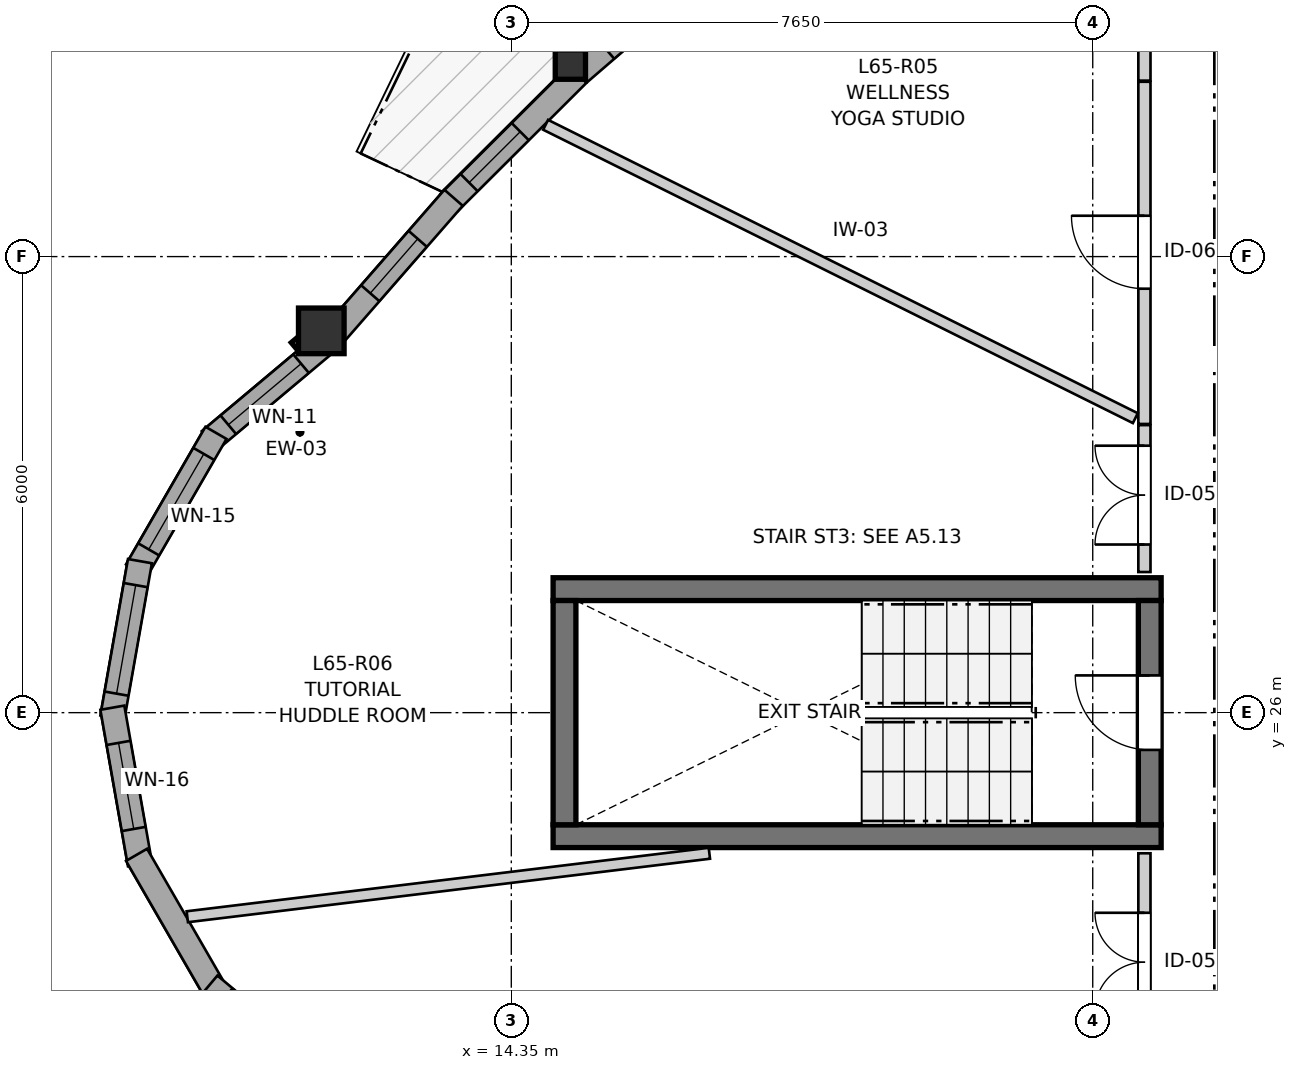
"""IFC4 building model, lengths in metres.
Left out: names, types, materials, properties, quantities, classifications, styles, units other than length and angle.
Written with IfcOpenShell. Run it as: python <this file> out.ifc"""

import sys

from ifc_helpers import new_model, si_unit, direction, frame, frame_2d, origin, origin_2d, place, context, subcontext, project, spatial, rectangle, i_section, extrude, source, transform, mapped, element, fill, save


model = new_model("IFC4")
c1 = context("Model", 3, precision=1e-05, world=origin(), true_north=direction((0.0, 1.0)))
c2 = subcontext(c1, "Body", "Model", "MODEL_VIEW")
j1 = project(units=[si_unit("LENGTHUNIT", "METRE"), si_unit("PLANEANGLEUNIT", "RADIAN")], contexts=[c1])
p1 = place(None, origin())
s1 = spatial("IfcSite", under=j1, at=p1, CompositionType="ELEMENT")
p2 = place(p1, origin())
s2 = spatial("IfcBuilding", under=s1, at=p2, CompositionType="ELEMENT")
p3 = place(p2, frame((0.0, 0.0, 218.0)))
s3 = spatial("IfcBuildingStorey", under=s2, at=p3, CompositionType="ELEMENT", Elevation=218.0)
for number, where, z_axis, x_axis in (
    (1, (14.9, 24.375, 0.0), (0.0, 0.0, 1.0), (1.0, 0.0, 0.0)),
    (2, (22.9, 27.625, 0.0), (0.0, 0.0, 1.0), (-1.0, 0.0, 0.0)),
):
    element("IfcWall", number, at=place(p3, frame(where, z_axis=z_axis, x_axis=x_axis)), inside=s3, PredefinedType="SHEAR", context=c2, shape_type="SweptSolid", body=[
        extrude(rectangle(XDim=8.0, YDim=0.3, at=frame_2d((4.0, 0.0))), origin(), (0.0, 0.0, 1.0), 2.96),
    ])
p4 = place(p3, frame((15.05, 27.475, 0.0), z_axis=(0.0, 0.0, 1.0), x_axis=(0.0, -1.0, 0.0)))
e3 = element("IfcWall", 3, at=p4, inside=s3, PredefinedType="SHEAR", context=c2, shape_type="SweptSolid", body=[
    extrude(rectangle(XDim=2.95, YDim=0.3, at=frame_2d((1.475, 0.0))), origin(), (0.0, 0.0, 1.0), 2.96),
])
p5 = place(p3, frame((22.75, 24.525, 0.0), z_axis=(0.0, 0.0, 1.0), x_axis=(0.0, 1.0, 0.0)))
e4 = element("IfcWall", 4, at=p5, inside=s3, PredefinedType="SHEAR", context=c2, shape_type="SweptSolid", body=[
    extrude(rectangle(XDim=2.95, YDim=0.3, at=frame_2d((1.475, 0.0))), origin(), (0.0, 0.0, 1.0), 2.96),
])
p6 = place(p5, frame((0.985, 0.0, 0.0)))
e5 = element("IfcOpeningElement", 5, at=p6, cuts=e4, PredefinedType="OPENING", context=c2, shape_type="SweptSolid", body=[
    extrude(rectangle(XDim=0.98, YDim=2.15, at=frame_2d((0.49, 1.075))), frame((0.0, 0.16, 0.0), z_axis=(0.0, -1.0, 0.0), x_axis=(1.0, 0.0, 0.0)), (0.0, 0.0, 1.0), 0.32),
])
m1 = source(origin(), c2, "Body", "SweptSolid", [
    extrude(rectangle(XDim=0.6, YDim=0.6, at=origin_2d()), origin(), (0.0, 0.0, 1.0), 2.96),
])
p7 = place(p3, frame((11.85, 31.023, 0.0), z_axis=(0.0, 0.0, 1.0), x_axis=(1.0, 0.0, 0.0)))
e6 = element("IfcColumn", 6, at=p7, inside=s3, PredefinedType="COLUMN", context=c2, shape_type="MappedRepresentation", body=[
    mapped(m1, transform((0.0, 0.0, 0.0), x_axis=(1.0, 0.0, 0.0), y_axis=(0.0, 1.0, 0.0), z_axis=(0.0, 0.0, 1.0), scale=1.0)),
])
m2 = source(origin(), c2, "Body", "SweptSolid", [
    extrude(i_section(OverallWidth=0.398, OverallDepth=0.387, WebThickness=0.019, FlangeThickness=0.03, FilletRadius=0.015, at=origin_2d()), origin(), (0.0, 0.0, 1.0), 2.96),
])
p8 = place(p3, frame((15.127, 34.526, 0.0), z_axis=(0.0, 0.0, 1.0), x_axis=(1.0, 0.0, 0.0)))
e7 = element("IfcColumn", 7, at=p8, inside=s3, PredefinedType="PILASTER", context=c2, shape_type="MappedRepresentation", body=[
    mapped(m2, transform((0.0, 0.0, 0.0), x_axis=(1.0, 0.0, 0.0), y_axis=(0.0, 1.0, 0.0), z_axis=(0.0, 0.0, 1.0), scale=1.0)),
])
p9 = place(p3, frame((11.884, 30.843, 0.0), z_axis=(0.0, 0.0, 1.0), x_axis=(-0.76606505432, -0.642763045414, 0.0)))
e8 = element("IfcWall", 8, at=p9, inside=s3, PredefinedType="SOLIDWALL", context=c2, shape_type="SweptSolid", body=[
    extrude(rectangle(XDim=1.962, YDim=0.32, at=frame_2d((0.981, 0.0))), origin(), (0.0, 0.0, 1.0), 2.58),
])
p10 = place(p9, frame((0.391, 0.0, 0.82)))
e9 = element("IfcOpeningElement", 9, at=p10, cuts=e8, PredefinedType="OPENING", context=c2, shape_type="SweptSolid", body=[
    extrude(rectangle(XDim=1.25, YDim=1.35, at=frame_2d((0.625, 0.675))), frame((0.0, 0.17, 0.0), z_axis=(0.0, -1.0, 0.0), x_axis=(1.0, 0.0, 0.0)), (0.0, 0.0, 1.0), 0.34),
])
p11 = place(p3, frame((10.465, 29.681, 0.0), z_axis=(0.0, 0.0, 1.0), x_axis=(-0.499995423472, -0.866028046028, 0.0)))
e10 = element("IfcWall", 10, at=p11, inside=s3, PredefinedType="SOLIDWALL", context=c2, shape_type="SweptSolid", body=[
    extrude(rectangle(XDim=2.09, YDim=0.32, at=frame_2d((1.045, 0.0))), origin(), (0.0, 0.0, 1.0), 2.58),
])
p12 = place(p11, frame((0.32, 0.0, 0.82)))
e11 = element("IfcOpeningElement", 11, at=p12, cuts=e10, PredefinedType="OPENING", context=c2, shape_type="SweptSolid", body=[
    extrude(rectangle(XDim=1.45, YDim=1.25, at=frame_2d((0.725, 0.625))), frame((0.0, 0.17, 0.0), z_axis=(0.0, -1.0, 0.0), x_axis=(1.0, 0.0, 0.0)), (0.0, 0.0, 1.0), 0.34),
])
p13 = place(p3, frame((9.464, 27.993, 0.0), z_axis=(0.0, 0.0, 1.0), x_axis=(-0.173672066494, -0.984803540469, 0.0)))
e12 = element("IfcWall", 12, at=p13, inside=s3, PredefinedType="SOLIDWALL", context=c2, shape_type="SweptSolid", body=[
    extrude(rectangle(XDim=2.09, YDim=0.32, at=frame_2d((1.045, 0.0))), origin(), (0.0, 0.0, 1.0), 2.58),
])
p14 = place(p13, frame((0.32, 0.0, 0.82)))
e13 = element("IfcOpeningElement", 13, at=p14, cuts=e12, PredefinedType="OPENING", context=c2, shape_type="SweptSolid", body=[
    extrude(rectangle(XDim=1.45, YDim=1.25, at=frame_2d((0.725, 0.625))), frame((0.0, 0.17, 0.0), z_axis=(0.0, -1.0, 0.0), x_axis=(1.0, 0.0, 0.0)), (0.0, 0.0, 1.0), 0.34),
])
p15 = place(p3, frame((9.101, 26.065, 0.0), z_axis=(0.0, 0.0, 1.0), x_axis=(0.173672066494, -0.984803540469, 0.0)))
e14 = element("IfcWall", 14, at=p15, inside=s3, PredefinedType="SOLIDWALL", context=c2, shape_type="SweptSolid", body=[
    extrude(rectangle(XDim=2.09, YDim=0.32, at=frame_2d((1.045, 0.0))), origin(), (0.0, 0.0, 1.0), 2.58),
])
p16 = place(p15, frame((0.47, 0.0, 0.82)))
e15 = element("IfcOpeningElement", 15, at=p16, cuts=e14, PredefinedType="OPENING", context=c2, shape_type="SweptSolid", body=[
    extrude(rectangle(XDim=1.15, YDim=1.2, at=frame_2d((0.575, 0.6))), frame((0.0, 0.17, 0.0), z_axis=(0.0, -1.0, 0.0), x_axis=(1.0, 0.0, 0.0)), (0.0, 0.0, 1.0), 0.34),
])
p17 = place(p3, frame((9.419, 24.129, 0.0), z_axis=(0.0, 0.0, 1.0), x_axis=(0.499995423472, -0.866028046028, 0.0)))
e16 = element("IfcWall", 16, at=p17, inside=s3, PredefinedType="SOLIDWALL", context=c2, shape_type="SweptSolid", body=[
    extrude(rectangle(XDim=2.09, YDim=0.32, at=frame_2d((1.045, 0.0))), origin(), (0.0, 0.0, 1.0), 2.58),
])
p18 = place(p3, frame((10.381, 22.419, 0.0), z_axis=(0.0, 0.0, 1.0), x_axis=(0.766099948115, -0.642721455608, 0.0)))
e17 = element("IfcWall", 17, at=p18, inside=s3, PredefinedType="SOLIDWALL", context=c2, shape_type="SweptSolid", body=[
    extrude(rectangle(XDim=2.032, YDim=0.32, at=frame_2d((1.016, 0.0))), origin(), (0.0, 0.0, 1.0), 2.58),
])
p19 = place(p18, frame((0.261, 0.0, 0.82)))
e18 = element("IfcOpeningElement", 18, at=p19, cuts=e17, PredefinedType="OPENING", context=c2, shape_type="SweptSolid", body=[
    extrude(rectangle(XDim=1.45, YDim=1.25, at=frame_2d((0.725, 0.625))), frame((0.0, 0.17, 0.0), z_axis=(0.0, -1.0, 0.0), x_axis=(1.0, 0.0, 0.0)), (0.0, 0.0, 1.0), 0.34),
])
p20 = place(p3, frame((17.03, 35.955, 0.0), z_axis=(0.0, 0.0, 1.0), x_axis=(-0.757489541562, -0.652847297937, 0.0)))
e19 = element("IfcWall", 19, at=p20, inside=s3, PredefinedType="SOLIDWALL", context=c2, shape_type="SweptSolid", body=[
    extrude(rectangle(XDim=2.354, YDim=0.32, at=frame_2d((1.177, 0.0))), origin(), (0.0, 0.0, 1.0), 2.58),
])
p21 = place(p20, frame((0.487, 0.0, 0.82)))
e20 = element("IfcOpeningElement", 20, at=p21, cuts=e19, PredefinedType="OPENING", context=c2, shape_type="SweptSolid", body=[
    extrude(rectangle(XDim=1.4, YDim=1.35, at=frame_2d((0.7, 0.675))), frame((0.0, 0.17, 0.0), z_axis=(0.0, -1.0, 0.0), x_axis=(1.0, 0.0, 0.0)), (0.0, 0.0, 1.0), 0.34),
])
p22 = place(p3, frame((15.226, 34.399, 0.0), z_axis=(0.0, 0.0, 1.0), x_axis=(-0.708431997636, -0.705779076429, 0.0)))
e21 = element("IfcWall", 21, at=p22, inside=s3, PredefinedType="SOLIDWALL", context=c2, shape_type="SweptSolid", body=[
    extrude(rectangle(XDim=2.393, YDim=0.32, at=frame_2d((1.196, 0.0))), origin(), (0.0, 0.0, 1.0), 2.58),
])
p23 = place(p22, frame((1.07, 0.0, 0.82)))
e22 = element("IfcOpeningElement", 22, at=p23, cuts=e21, PredefinedType="OPENING", context=c2, shape_type="SweptSolid", body=[
    extrude(rectangle(XDim=0.95, YDim=1.35, at=frame_2d((0.475, 0.675))), frame((0.0, 0.17, 0.0), z_axis=(0.0, -1.0, 0.0), x_axis=(1.0, 0.0, 0.0)), (0.0, 0.0, 1.0), 0.34),
])
p24 = place(p3, frame((13.591, 32.774, 0.0), z_axis=(0.0, 0.0, 1.0), x_axis=(-0.657601126926, -0.753366283999, 0.0)))
e23 = element("IfcWall", 23, at=p24, inside=s3, PredefinedType="SOLIDWALL", context=c2, shape_type="SweptSolid", body=[
    extrude(rectangle(XDim=2.374, YDim=0.32, at=frame_2d((1.187, 0.0))), origin(), (0.0, 0.0, 1.0), 2.58),
])
p25 = place(p24, frame((0.717, 0.0, 0.82)))
e24 = element("IfcOpeningElement", 24, at=p25, cuts=e23, PredefinedType="OPENING", context=c2, shape_type="SweptSolid", body=[
    extrude(rectangle(XDim=0.95, YDim=1.35, at=frame_2d((0.475, 0.675))), frame((0.0, 0.17, 0.0), z_axis=(0.0, -1.0, 0.0), x_axis=(1.0, 0.0, 0.0)), (0.0, 0.0, 1.0), 0.34),
])
p26 = place(p3, frame((22.68, 29.798, 0.0), z_axis=(0.0, 0.0, 1.0), x_axis=(0.0, 1.0, 0.0)))
e25 = element("IfcWall", 25, at=p26, inside=s3, PredefinedType="PARTITIONING", context=c2, shape_type="SweptSolid", body=[
    extrude(rectangle(XDim=4.502, YDim=0.16, at=frame_2d((2.251, 0.0))), origin(), (0.0, 0.0, 1.0), 2.96),
])
p27 = place(p26, frame((1.78, 0.0, 0.0)))
e26 = element("IfcOpeningElement", 26, at=p27, cuts=e25, PredefinedType="OPENING", context=c2, shape_type="SweptSolid", body=[
    extrude(rectangle(XDim=0.96, YDim=2.1, at=frame_2d((0.48, 1.05))), frame((0.0, 0.09, 0.0), z_axis=(0.0, -1.0, 0.0), x_axis=(1.0, 0.0, 0.0)), (0.0, 0.0, 1.0), 0.18),
])
p28 = place(p3, frame((22.68, 21.241, 0.0), z_axis=(0.0, 0.0, 1.0), x_axis=(0.0, 1.0, 0.0)))
e27 = element("IfcWall", 27, at=p28, inside=s3, PredefinedType="PARTITIONING", context=c2, shape_type="SweptSolid", body=[
    extrude(rectangle(XDim=2.909, YDim=0.16, at=frame_2d((1.455, 0.0))), origin(), (0.0, 0.0, 1.0), 2.96),
])
p29 = place(p28, frame((0.826, 0.0, 0.0)))
e28 = element("IfcOpeningElement", 28, at=p29, cuts=e27, PredefinedType="OPENING", context=c2, shape_type="SweptSolid", body=[
    extrude(rectangle(XDim=1.3, YDim=2.1, at=frame_2d((0.65, 1.05))), frame((0.0, 0.09, 0.0), z_axis=(0.0, -1.0, 0.0), x_axis=(1.0, 0.0, 0.0)), (0.0, 0.0, 1.0), 0.18),
])
p30 = place(p3, frame((22.68, 27.85, 0.0), z_axis=(0.0, 0.0, 1.0), x_axis=(0.0, 1.0, 0.0)))
e29 = element("IfcWall", 29, at=p30, inside=s3, PredefinedType="PARTITIONING", context=c2, shape_type="SweptSolid", body=[
    extrude(rectangle(XDim=1.933, YDim=0.16, at=frame_2d((0.966, 0.0))), origin(), (0.0, 0.0, 1.0), 2.96),
])
p31 = place(p30, frame((0.362, 0.0, 0.0)))
e30 = element("IfcOpeningElement", 30, at=p31, cuts=e29, PredefinedType="OPENING", context=c2, shape_type="SweptSolid", body=[
    extrude(rectangle(XDim=1.3, YDim=2.1, at=frame_2d((0.65, 1.05))), frame((0.0, 0.09, 0.0), z_axis=(0.0, -1.0, 0.0), x_axis=(1.0, 0.0, 0.0)), (0.0, 0.0, 1.0), 0.18),
])
p32 = place(p3, frame((14.802, 33.734, 0.0), z_axis=(0.0, 0.0, 1.0), x_axis=(0.895354955696, -0.445353234311, 0.0)))
e31 = element("IfcWall", 31, at=p32, inside=s3, PredefinedType="PARTITIONING", context=c2, shape_type="SweptSolid", body=[
    extrude(rectangle(XDim=8.666, YDim=0.145, at=frame_2d((4.333, 0.0))), origin(), (0.0, 0.0, 1.0), 2.96),
])
p33 = place(p3, frame((10.087, 23.315, 0.0), z_axis=(0.0, 0.0, 1.0), x_axis=(0.992692853732, 0.120668546642, 0.0)))
e32 = element("IfcWall", 32, at=p33, inside=s3, PredefinedType="PARTITIONING", context=c2, shape_type="SweptSolid", body=[
    extrude(rectangle(XDim=6.919, YDim=0.145, at=frame_2d((3.46, 0.0))), origin(), (0.0, 0.0, 1.0), 2.96),
])
p34 = place(p3, frame((22.68, 34.315, 0.0), z_axis=(0.0, 0.0, 1.0), x_axis=(0.0, 1.0, 0.0)))
e33 = element("IfcWall", 33, at=p34, inside=s3, PredefinedType="PARTITIONING", context=c2, shape_type="SweptSolid", body=[
    extrude(rectangle(XDim=0.707, YDim=0.16, at=frame_2d((0.353, 0.0))), origin(), (0.0, 0.0, 1.0), 2.96),
])
m3 = source(origin(), c2, "Body", "SweptSolid", [
    extrude(rectangle(XDim=1.25, YDim=1.35, at=frame_2d((0.625, 0.675))), frame((0.0, 0.03, 0.0), z_axis=(0.0, -1.0, 0.0), x_axis=(1.0, 0.0, 0.0)), (0.0, 0.0, 1.0), 0.06),
])
p35 = place(p10, origin())
e34 = element("IfcWindow", 34, at=p35, inside=s3, PartitioningType="SINGLE_PANEL", PredefinedType="WINDOW", context=c2, shape_type="MappedRepresentation", body=[
    mapped(m3, transform((0.0, 0.0, 0.0), x_axis=(1.0, 0.0, 0.0), y_axis=(0.0, 1.0, 0.0), z_axis=(0.0, 0.0, 1.0), scale=1.0)),
])
fill(e9, e34)
m4 = source(origin(), c2, "Body", "SweptSolid", [
    extrude(rectangle(XDim=1.45, YDim=1.25, at=frame_2d((0.725, 0.625))), frame((0.0, 0.03, 0.0), z_axis=(0.0, -1.0, 0.0), x_axis=(1.0, 0.0, 0.0)), (0.0, 0.0, 1.0), 0.06),
])
p36 = place(p12, origin())
e35 = element("IfcWindow", 35, at=p36, inside=s3, PartitioningType="SINGLE_PANEL", PredefinedType="WINDOW", context=c2, shape_type="MappedRepresentation", body=[
    mapped(m4, transform((0.0, 0.0, 0.0), x_axis=(1.0, 0.0, 0.0), y_axis=(0.0, 1.0, 0.0), z_axis=(0.0, 0.0, 1.0), scale=1.0)),
])
fill(e11, e35)
p37 = place(p14, origin())
e36 = element("IfcWindow", 36, at=p37, inside=s3, PartitioningType="SINGLE_PANEL", PredefinedType="WINDOW", context=c2, shape_type="MappedRepresentation", body=[
    mapped(m4, transform((0.0, 0.0, 0.0), x_axis=(1.0, 0.0, 0.0), y_axis=(0.0, 1.0, 0.0), z_axis=(0.0, 0.0, 1.0), scale=1.0)),
])
fill(e13, e36)
m5 = source(origin(), c2, "Body", "SweptSolid", [
    extrude(rectangle(XDim=1.15, YDim=1.2, at=frame_2d((0.575, 0.6))), frame((0.0, 0.03, 0.0), z_axis=(0.0, -1.0, 0.0), x_axis=(1.0, 0.0, 0.0)), (0.0, 0.0, 1.0), 0.06),
])
p38 = place(p16, origin())
e37 = element("IfcWindow", 37, at=p38, inside=s3, PartitioningType="SINGLE_PANEL", PredefinedType="WINDOW", context=c2, shape_type="MappedRepresentation", body=[
    mapped(m5, transform((0.0, 0.0, 0.0), x_axis=(1.0, 0.0, 0.0), y_axis=(0.0, 1.0, 0.0), z_axis=(0.0, 0.0, 1.0), scale=1.0)),
])
fill(e15, e37)
m6 = source(origin(), c2, "Body", "SweptSolid", [
    extrude(rectangle(XDim=0.95, YDim=1.35, at=frame_2d((0.475, 0.675))), frame((0.0, 0.03, 0.0), z_axis=(0.0, -1.0, 0.0), x_axis=(1.0, 0.0, 0.0)), (0.0, 0.0, 1.0), 0.06),
])
p39 = place(p23, origin())
e38 = element("IfcWindow", 38, at=p39, inside=s3, PartitioningType="SINGLE_PANEL", PredefinedType="WINDOW", context=c2, shape_type="MappedRepresentation", body=[
    mapped(m6, transform((0.0, 0.0, 0.0), x_axis=(1.0, 0.0, 0.0), y_axis=(0.0, 1.0, 0.0), z_axis=(0.0, 0.0, 1.0), scale=1.0)),
])
fill(e22, e38)
p40 = place(p25, origin())
e39 = element("IfcWindow", 39, at=p40, inside=s3, PartitioningType="SINGLE_PANEL", PredefinedType="WINDOW", context=c2, shape_type="MappedRepresentation", body=[
    mapped(m6, transform((0.0, 0.0, 0.0), x_axis=(1.0, 0.0, 0.0), y_axis=(0.0, 1.0, 0.0), z_axis=(0.0, 0.0, 1.0), scale=1.0)),
])
fill(e24, e39)
m7 = source(origin(), c2, "Body", "SweptSolid", [
    extrude(rectangle(XDim=0.98, YDim=2.15, at=frame_2d((0.49, 1.075))), frame((0.0, 0.025, 0.0), z_axis=(0.0, -1.0, 0.0), x_axis=(1.0, 0.0, 0.0)), (0.0, 0.0, 1.0), 0.05),
])
p41 = place(p6, origin())
e40 = element("IfcDoor", 40, at=p41, inside=s3, OperationType="SINGLE_SWING_RIGHT", PredefinedType="DOOR", context=c2, shape_type="MappedRepresentation", body=[
    mapped(m7, transform((0.0, 0.0, 0.0), x_axis=(1.0, 0.0, 0.0), y_axis=(0.0, 1.0, 0.0), z_axis=(0.0, 0.0, 1.0), scale=1.0)),
])
fill(e5, e40)
m8 = source(origin(), c2, "Body", "SweptSolid", [
    extrude(rectangle(XDim=0.96, YDim=2.1, at=frame_2d((0.48, 1.05))), frame((0.0, 0.025, 0.0), z_axis=(0.0, -1.0, 0.0), x_axis=(1.0, 0.0, 0.0)), (0.0, 0.0, 1.0), 0.05),
])
p42 = place(p27, origin())
e41 = element("IfcDoor", 41, at=p42, inside=s3, OperationType="SINGLE_SWING_RIGHT", PredefinedType="DOOR", context=c2, shape_type="MappedRepresentation", body=[
    mapped(m8, transform((0.0, 0.0, 0.0), x_axis=(1.0, 0.0, 0.0), y_axis=(0.0, 1.0, 0.0), z_axis=(0.0, 0.0, 1.0), scale=1.0)),
])
fill(e26, e41)
m9 = source(origin(), c2, "Body", "SweptSolid", [
    extrude(rectangle(XDim=1.3, YDim=2.1, at=frame_2d((0.65, 1.05))), frame((0.0, 0.025, 0.0), z_axis=(0.0, -1.0, 0.0), x_axis=(1.0, 0.0, 0.0)), (0.0, 0.0, 1.0), 0.05),
])
p43 = place(p29, origin())
e42 = element("IfcDoor", 42, at=p43, inside=s3, OperationType="DOUBLE_DOOR_SINGLE_SWING", PredefinedType="DOOR", context=c2, shape_type="MappedRepresentation", body=[
    mapped(m9, transform((0.0, 0.0, 0.0), x_axis=(1.0, 0.0, 0.0), y_axis=(0.0, 1.0, 0.0), z_axis=(0.0, 0.0, 1.0), scale=1.0)),
])
fill(e28, e42)
p44 = place(p31, origin())
e43 = element("IfcDoor", 43, at=p44, inside=s3, OperationType="DOUBLE_DOOR_SINGLE_SWING", PredefinedType="DOOR", context=c2, shape_type="MappedRepresentation", body=[
    mapped(m9, transform((0.0, 0.0, 0.0), x_axis=(1.0, 0.0, 0.0), y_axis=(0.0, 1.0, 0.0), z_axis=(0.0, 0.0, 1.0), scale=1.0)),
])
fill(e30, e43)
save(model, sys.argv[1])
